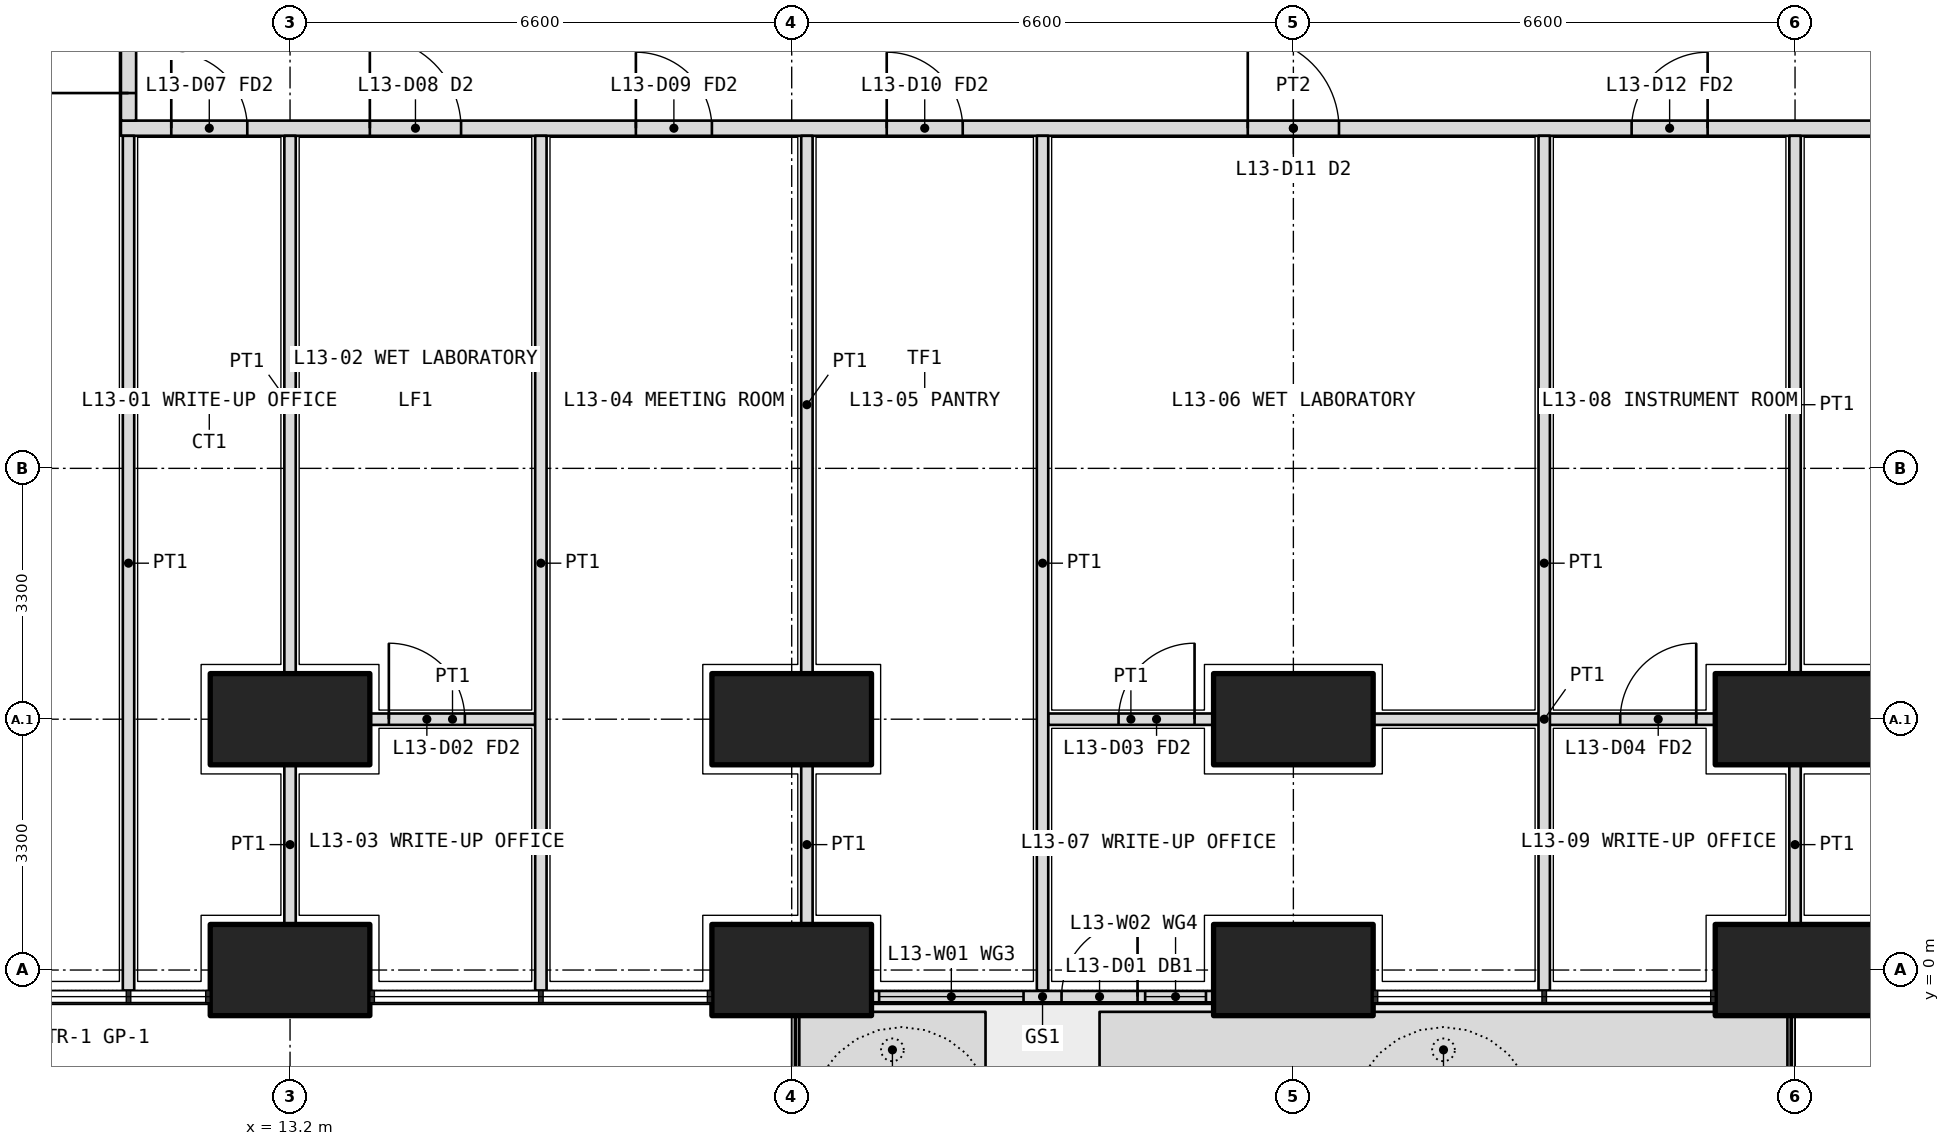
"""IFC4 building model, lengths in metres.
Left out: names, types, materials, properties, quantities, classifications, styles, units other than length and angle.
Written with IfcOpenShell. Run it as: python <this file> out.ifc"""

import sys

from ifc_helpers import new_model, si_unit, direction, frame, frame_2d, origin, origin_2d, place, context, subcontext, project, spatial, polyline, rectangle, outline, extrude, element, fill, save


model = new_model("IFC4")
c1 = context("Model", 3, precision=1e-05, world=origin(), true_north=direction((0.0, 1.0)))
c2 = subcontext(c1, "Body", "Model", "MODEL_VIEW")
j1 = project(units=[si_unit("LENGTHUNIT", "METRE"), si_unit("PLANEANGLEUNIT", "RADIAN")], contexts=[c1])
p1 = place(None, origin())
s1 = spatial("IfcSite", under=j1, at=p1, CompositionType="ELEMENT")
p2 = place(p1, origin())
s2 = spatial("IfcBuilding", under=s1, at=p2, CompositionType="ELEMENT")
p3 = place(p2, frame((0.0, 0.0, 59.1)))
s3 = spatial("IfcBuildingStorey", under=s2, at=p3, CompositionType="ELEMENT", Elevation=59.1)
for number, where, z_axis, x_axis in (
    (1, (13.2, 0.0, 0.0), (0.0, 0.0, 1.0), (1.0, 0.0, 0.0)),
    (2, (19.8, 0.0, 0.0), (0.0, 0.0, 1.0), (1.0, 0.0, 0.0)),
    (3, (26.4, 0.0, 0.0), (0.0, 0.0, 1.0), (1.0, 0.0, 0.0)),
    (4, (33.0, 0.0, 0.0), (0.0, 0.0, 1.0), (1.0, 0.0, 0.0)),
    (5, (13.2, 3.3, 0.0), (0.0, 0.0, 1.0), (1.0, 0.0, 0.0)),
    (6, (19.8, 3.3, 0.0), (0.0, 0.0, 1.0), (1.0, 0.0, 0.0)),
    (7, (26.4, 3.3, 0.0), (0.0, 0.0, 1.0), (1.0, 0.0, 0.0)),
    (8, (33.0, 3.3, 0.0), (0.0, 0.0, 1.0), (1.0, 0.0, 0.0)),
):
    element("IfcColumn", number, at=place(p3, frame(where, z_axis=z_axis, x_axis=x_axis)), inside=s3, PredefinedType="COLUMN", context=c2, shape_type="SweptSolid", body=[
        extrude(rectangle(XDim=2.1, YDim=1.2, at=origin_2d()), origin(), (0.0, 0.0, 1.0), 4.2),
    ])
p4 = place(p3, origin())
e9 = element("IfcWall", 9, at=p4, inside=s3, PredefinedType="USERDEFINED", context=c2, shape_type="SweptSolid", body=[
    extrude(outline(polyline([(19.9, -1.55), (22.35, -1.55), (22.35, -0.55), (19.9, -0.55), (19.9, -1.55)]), holes=[polyline([(20.05, -1.4), (22.2, -1.4), (22.2, -0.7), (20.05, -0.7), (20.05, -1.4)])]), origin(), (0.0, 0.0, 1.0), 1.05),
])
p5 = place(p3, origin())
e10 = element("IfcWall", 10, at=p5, inside=s3, PredefinedType="USERDEFINED", context=c2, shape_type="SweptSolid", body=[
    extrude(outline(polyline([(23.85, -1.55), (32.9, -1.55), (32.9, -0.55), (23.85, -0.55), (23.85, -1.55)]), holes=[polyline([(24.0, -1.4), (32.75, -1.4), (32.75, -0.7), (24.0, -0.7), (24.0, -1.4)])]), origin(), (0.0, 0.0, 1.0), 1.05),
])
p6 = place(p3, frame((20.85, -0.35, 0.0), z_axis=(0.0, 0.0, 1.0), x_axis=(1.0, 0.0, 0.0)))
e11 = element("IfcWall", 11, at=p6, inside=s3, PredefinedType="SOLIDWALL", context=c2, shape_type="SweptSolid", body=[
    extrude(rectangle(XDim=4.5, YDim=0.15, at=frame_2d((2.25, 0.0))), origin(), (0.0, 0.0, 1.0), 2.7),
])
p7 = place(p6, frame((2.5, 0.0, 0.0)))
e12 = element("IfcOpeningElement", 12, at=p7, cuts=e11, PredefinedType="OPENING", context=c2, shape_type="SweptSolid", body=[
    extrude(rectangle(XDim=1.0, YDim=2.4, at=frame_2d((0.5, 1.2))), frame((0.0, 0.085, 0.0), z_axis=(0.0, -1.0, 0.0), x_axis=(1.0, 0.0, 0.0)), (0.0, 0.0, 1.0), 0.17),
])
p8 = place(p6, frame((0.1, 0.0, 0.1)))
e13 = element("IfcOpeningElement", 13, at=p8, cuts=e11, PredefinedType="OPENING", context=c2, shape_type="SweptSolid", body=[
    extrude(rectangle(XDim=1.9, YDim=2.3, at=frame_2d((0.95, 1.15))), frame((0.0, 0.085, 0.0), z_axis=(0.0, -1.0, 0.0), x_axis=(1.0, 0.0, 0.0)), (0.0, 0.0, 1.0), 0.17),
])
p9 = place(p6, frame((3.6, 0.0, 0.1)))
e14 = element("IfcOpeningElement", 14, at=p9, cuts=e11, PredefinedType="OPENING", context=c2, shape_type="SweptSolid", body=[
    extrude(rectangle(XDim=0.8, YDim=2.3, at=frame_2d((0.4, 1.15))), frame((0.0, 0.085, 0.0), z_axis=(0.0, -1.0, 0.0), x_axis=(1.0, 0.0, 0.0)), (0.0, 0.0, 1.0), 0.17),
])
p10 = place(p3, frame((10.975, 11.075, 0.0), z_axis=(0.0, 0.0, 1.0), x_axis=(1.0, 0.0, 0.0)))
e15 = element("IfcWall", 15, at=p10, inside=s3, PredefinedType="PARTITIONING", context=c2, shape_type="SweptSolid", body=[
    extrude(rectangle(XDim=30.85, YDim=0.2, at=frame_2d((15.425, 0.0))), origin(), (0.0, 0.0, 1.0), 2.85),
])
p11 = place(p10, frame((0.663, 0.0, 0.0)))
e16 = element("IfcOpeningElement", 16, at=p11, cuts=e15, PredefinedType="OPENING", context=c2, shape_type="SweptSolid", body=[
    extrude(rectangle(XDim=1.0, YDim=2.1, at=frame_2d((0.5, 1.05))), frame((0.0, 0.11, 0.0), z_axis=(0.0, -1.0, 0.0), x_axis=(1.0, 0.0, 0.0)), (0.0, 0.0, 1.0), 0.22),
])
p12 = place(p10, frame((3.275, 0.0, 0.0)))
e17 = element("IfcOpeningElement", 17, at=p12, cuts=e15, PredefinedType="OPENING", context=c2, shape_type="SweptSolid", body=[
    extrude(rectangle(XDim=1.2, YDim=2.1, at=frame_2d((0.6, 1.05))), frame((0.0, 0.11, 0.0), z_axis=(0.0, -1.0, 0.0), x_axis=(1.0, 0.0, 0.0)), (0.0, 0.0, 1.0), 0.22),
])
p13 = place(p10, frame((6.775, 0.0, 0.0)))
e18 = element("IfcOpeningElement", 18, at=p13, cuts=e15, PredefinedType="OPENING", context=c2, shape_type="SweptSolid", body=[
    extrude(rectangle(XDim=1.0, YDim=2.1, at=frame_2d((0.5, 1.05))), frame((0.0, 0.11, 0.0), z_axis=(0.0, -1.0, 0.0), x_axis=(1.0, 0.0, 0.0)), (0.0, 0.0, 1.0), 0.22),
])
p14 = place(p10, frame((10.075, 0.0, 0.0)))
e19 = element("IfcOpeningElement", 19, at=p14, cuts=e15, PredefinedType="OPENING", context=c2, shape_type="SweptSolid", body=[
    extrude(rectangle(XDim=1.0, YDim=2.1, at=frame_2d((0.5, 1.05))), frame((0.0, 0.11, 0.0), z_axis=(0.0, -1.0, 0.0), x_axis=(1.0, 0.0, 0.0)), (0.0, 0.0, 1.0), 0.22),
])
p15 = place(p10, frame((14.825, 0.0, 0.0)))
e20 = element("IfcOpeningElement", 20, at=p15, cuts=e15, PredefinedType="OPENING", context=c2, shape_type="SweptSolid", body=[
    extrude(rectangle(XDim=1.2, YDim=2.1, at=frame_2d((0.6, 1.05))), frame((0.0, 0.11, 0.0), z_axis=(0.0, -1.0, 0.0), x_axis=(1.0, 0.0, 0.0)), (0.0, 0.0, 1.0), 0.22),
])
p16 = place(p10, frame((19.875, 0.0, 0.0)))
e21 = element("IfcOpeningElement", 21, at=p16, cuts=e15, PredefinedType="OPENING", context=c2, shape_type="SweptSolid", body=[
    extrude(rectangle(XDim=1.0, YDim=2.1, at=frame_2d((0.5, 1.05))), frame((0.0, 0.11, 0.0), z_axis=(0.0, -1.0, 0.0), x_axis=(1.0, 0.0, 0.0)), (0.0, 0.0, 1.0), 0.22),
])
p17 = place(p10, frame((25.887, 0.0, 0.0)))
e22 = element("IfcOpeningElement", 22, at=p17, cuts=e15, PredefinedType="OPENING", context=c2, shape_type="SweptSolid", body=[
    extrude(rectangle(XDim=1.0, YDim=2.1, at=frame_2d((0.5, 1.05))), frame((0.0, 0.11, 0.0), z_axis=(0.0, -1.0, 0.0), x_axis=(1.0, 0.0, 0.0)), (0.0, 0.0, 1.0), 0.22),
])
p18 = place(p3, frame((11.075, 11.175, 0.0), z_axis=(0.0, 0.0, 1.0), x_axis=(0.0, 1.0, 0.0)))
e23 = element("IfcWall", 23, at=p18, inside=s3, PredefinedType="PARTITIONING", context=c2, shape_type="SweptSolid", body=[
    extrude(rectangle(XDim=23.85, YDim=0.2, at=frame_2d((11.925, 0.0))), origin(), (0.0, 0.0, 1.0), 2.85),
])
p19 = place(p18, frame((0.363, 0.0, 0.0)))
e24 = element("IfcOpeningElement", 24, at=p19, cuts=e23, PredefinedType="OPENING", context=c2, shape_type="SweptSolid", body=[
    extrude(rectangle(XDim=1.2, YDim=2.1, at=frame_2d((0.6, 1.05))), frame((0.0, 0.11, 0.0), z_axis=(0.0, -1.0, 0.0), x_axis=(1.0, 0.0, 0.0)), (0.0, 0.0, 1.0), 0.22),
])
p20 = place(p18, frame((2.575, 0.0, 0.0)))
e25 = element("IfcOpeningElement", 25, at=p20, cuts=e23, PredefinedType="OPENING", context=c2, shape_type="SweptSolid", body=[
    extrude(rectangle(XDim=1.0, YDim=2.1, at=frame_2d((0.5, 1.05))), frame((0.0, 0.11, 0.0), z_axis=(0.0, -1.0, 0.0), x_axis=(1.0, 0.0, 0.0)), (0.0, 0.0, 1.0), 0.22),
])
p21 = place(p18, frame((5.65, 0.0, 0.0)))
e26 = element("IfcOpeningElement", 26, at=p21, cuts=e23, PredefinedType="OPENING", context=c2, shape_type="SweptSolid", body=[
    extrude(rectangle(XDim=0.9, YDim=2.1, at=frame_2d((0.45, 1.05))), frame((0.0, 0.11, 0.0), z_axis=(0.0, -1.0, 0.0), x_axis=(1.0, 0.0, 0.0)), (0.0, 0.0, 1.0), 0.22),
])
p22 = place(p18, frame((9.5, 0.0, 0.0)))
e27 = element("IfcOpeningElement", 27, at=p22, cuts=e23, PredefinedType="OPENING", context=c2, shape_type="SweptSolid", body=[
    extrude(rectangle(XDim=0.9, YDim=2.1, at=frame_2d((0.45, 1.05))), frame((0.0, 0.11, 0.0), z_axis=(0.0, -1.0, 0.0), x_axis=(1.0, 0.0, 0.0)), (0.0, 0.0, 1.0), 0.22),
])
p23 = place(p18, frame((13.025, 0.0, 0.0)))
e28 = element("IfcOpeningElement", 28, at=p23, cuts=e23, PredefinedType="OPENING", context=c2, shape_type="SweptSolid", body=[
    extrude(rectangle(XDim=1.0, YDim=2.1, at=frame_2d((0.5, 1.05))), frame((0.0, 0.11, 0.0), z_axis=(0.0, -1.0, 0.0), x_axis=(1.0, 0.0, 0.0)), (0.0, 0.0, 1.0), 0.22),
])
p24 = place(p18, frame((18.025, 0.0, 0.0)))
e29 = element("IfcOpeningElement", 29, at=p24, cuts=e23, PredefinedType="OPENING", context=c2, shape_type="SweptSolid", body=[
    extrude(rectangle(XDim=1.0, YDim=2.1, at=frame_2d((0.5, 1.05))), frame((0.0, 0.11, 0.0), z_axis=(0.0, -1.0, 0.0), x_axis=(1.0, 0.0, 0.0)), (0.0, 0.0, 1.0), 0.22),
])
p25 = place(p18, frame((22.387, 0.0, 0.0)))
e30 = element("IfcOpeningElement", 30, at=p25, cuts=e23, PredefinedType="OPENING", context=c2, shape_type="SweptSolid", body=[
    extrude(rectangle(XDim=1.0, YDim=2.1, at=frame_2d((0.5, 1.05))), frame((0.0, 0.11, 0.0), z_axis=(0.0, -1.0, 0.0), x_axis=(1.0, 0.0, 0.0)), (0.0, 0.0, 1.0), 0.22),
])
p26 = place(p3, frame((11.075, -0.27, 0.0), z_axis=(0.0, 0.0, 1.0), x_axis=(0.0, 1.0, 0.0)))
e31 = element("IfcWall", 31, at=p26, inside=s3, PredefinedType="PARTITIONING", context=c2, shape_type="SweptSolid", body=[
    extrude(rectangle(XDim=11.245, YDim=0.15, at=frame_2d((5.623, 0.0))), origin(), (0.0, 0.0, 1.0), 2.7),
])
p27 = place(p3, frame((14.25, 3.3, 0.0), z_axis=(0.0, 0.0, 1.0), x_axis=(1.0, 0.0, 0.0)))
e32 = element("IfcWall", 32, at=p27, inside=s3, PredefinedType="PARTITIONING", context=c2, shape_type="SweptSolid", body=[
    extrude(rectangle(XDim=2.175, YDim=0.15, at=frame_2d((1.087, 0.0))), origin(), (0.0, 0.0, 1.0), 3.9),
])
p28 = place(p27, frame((0.25, 0.0, 0.0)))
e33 = element("IfcOpeningElement", 33, at=p28, cuts=e32, PredefinedType="OPENING", context=c2, shape_type="SweptSolid", body=[
    extrude(rectangle(XDim=1.0, YDim=2.1, at=frame_2d((0.5, 1.05))), frame((0.0, 0.085, 0.0), z_axis=(0.0, -1.0, 0.0), x_axis=(1.0, 0.0, 0.0)), (0.0, 0.0, 1.0), 0.17),
])
p29 = place(p3, frame((23.175, 3.3, 0.0), z_axis=(0.0, 0.0, 1.0), x_axis=(1.0, 0.0, 0.0)))
e34 = element("IfcWall", 34, at=p29, inside=s3, PredefinedType="PARTITIONING", context=c2, shape_type="SweptSolid", body=[
    extrude(rectangle(XDim=2.175, YDim=0.15, at=frame_2d((1.087, 0.0))), origin(), (0.0, 0.0, 1.0), 3.9),
])
p30 = place(p29, frame((0.925, 0.0, 0.0)))
e35 = element("IfcOpeningElement", 35, at=p30, cuts=e34, PredefinedType="OPENING", context=c2, shape_type="SweptSolid", body=[
    extrude(rectangle(XDim=1.0, YDim=2.1, at=frame_2d((0.5, 1.05))), frame((0.0, 0.085, 0.0), z_axis=(0.0, -1.0, 0.0), x_axis=(1.0, 0.0, 0.0)), (0.0, 0.0, 1.0), 0.17),
])
p31 = place(p3, frame((27.45, 3.3, 0.0), z_axis=(0.0, 0.0, 1.0), x_axis=(1.0, 0.0, 0.0)))
e36 = element("IfcWall", 36, at=p31, inside=s3, PredefinedType="PARTITIONING", context=c2, shape_type="SweptSolid", body=[
    extrude(rectangle(XDim=4.5, YDim=0.15, at=frame_2d((2.25, 0.0))), origin(), (0.0, 0.0, 1.0), 3.9),
])
p32 = place(p31, frame((3.25, 0.0, 0.0)))
e37 = element("IfcOpeningElement", 37, at=p32, cuts=e36, PredefinedType="OPENING", context=c2, shape_type="SweptSolid", body=[
    extrude(rectangle(XDim=1.0, YDim=2.1, at=frame_2d((0.5, 1.05))), frame((0.0, 0.085, 0.0), z_axis=(0.0, -1.0, 0.0), x_axis=(1.0, 0.0, 0.0)), (0.0, 0.0, 1.0), 0.17),
])
p33 = place(p3, frame((20.0, 0.6, 0.0), z_axis=(0.0, 0.0, 1.0), x_axis=(0.0, 1.0, 0.0)))
e38 = element("IfcWall", 38, at=p33, inside=s3, PredefinedType="PARTITIONING", context=c2, shape_type="SweptSolid", body=[
    extrude(rectangle(XDim=2.1, YDim=0.15, at=frame_2d((1.05, 0.0))), origin(), (0.0, 0.0, 1.0), 2.85),
])
p34 = place(p3, frame((20.0, 3.9, 0.0), z_axis=(0.0, 0.0, 1.0), x_axis=(0.0, 1.0, 0.0)))
e39 = element("IfcWall", 39, at=p34, inside=s3, PredefinedType="PARTITIONING", context=c2, shape_type="SweptSolid", body=[
    extrude(rectangle(XDim=7.075, YDim=0.15, at=frame_2d((3.538, 0.0))), origin(), (0.0, 0.0, 1.0), 2.85),
])
p35 = place(p3, frame((23.1, -0.27, 0.0), z_axis=(0.0, 0.0, 1.0), x_axis=(0.0, 1.0, 0.0)))
e40 = element("IfcWall", 40, at=p35, inside=s3, PredefinedType="PARTITIONING", context=c2, shape_type="SweptSolid", body=[
    extrude(rectangle(XDim=11.245, YDim=0.15, at=frame_2d((5.623, 0.0))), origin(), (0.0, 0.0, 1.0), 2.7),
])
p36 = place(p3, frame((13.2, 0.6, 0.0), z_axis=(0.0, 0.0, 1.0), x_axis=(0.0, 1.0, 0.0)))
e41 = element("IfcWall", 41, at=p36, inside=s3, PredefinedType="PARTITIONING", context=c2, shape_type="SweptSolid", body=[
    extrude(rectangle(XDim=2.1, YDim=0.15, at=frame_2d((1.05, 0.0))), origin(), (0.0, 0.0, 1.0), 2.85),
])
p37 = place(p3, frame((13.2, 3.9, 0.0), z_axis=(0.0, 0.0, 1.0), x_axis=(0.0, 1.0, 0.0)))
e42 = element("IfcWall", 42, at=p37, inside=s3, PredefinedType="PARTITIONING", context=c2, shape_type="SweptSolid", body=[
    extrude(rectangle(XDim=7.075, YDim=0.15, at=frame_2d((3.538, 0.0))), origin(), (0.0, 0.0, 1.0), 2.85),
])
for number, where, z_axis, x_axis in (
    (43, (16.5, -0.27, 0.0), (0.0, 0.0, 1.0), (0.0, 1.0, 0.0)),
    (44, (29.7, -0.27, 0.0), (0.0, 0.0, 1.0), (0.0, 1.0, 0.0)),
):
    element("IfcWall", number, at=place(p3, frame(where, z_axis=z_axis, x_axis=x_axis)), inside=s3, PredefinedType="PARTITIONING", context=c2, shape_type="SweptSolid", body=[
        extrude(rectangle(XDim=11.245, YDim=0.15, at=frame_2d((5.623, 0.0))), origin(), (0.0, 0.0, 1.0), 2.7),
    ])
p38 = place(p3, frame((33.0, 0.6, 0.0), z_axis=(0.0, 0.0, 1.0), x_axis=(0.0, 1.0, 0.0)))
e45 = element("IfcWall", 45, at=p38, inside=s3, PredefinedType="PARTITIONING", context=c2, shape_type="SweptSolid", body=[
    extrude(rectangle(XDim=2.1, YDim=0.15, at=frame_2d((1.05, 0.0))), origin(), (0.0, 0.0, 1.0), 2.85),
])
p39 = place(p3, frame((33.0, 3.9, 0.0), z_axis=(0.0, 0.0, 1.0), x_axis=(0.0, 1.0, 0.0)))
e46 = element("IfcWall", 46, at=p39, inside=s3, PredefinedType="PARTITIONING", context=c2, shape_type="SweptSolid", body=[
    extrude(rectangle(XDim=7.075, YDim=0.15, at=frame_2d((3.538, 0.0))), origin(), (0.0, 0.0, 1.0), 2.85),
])
p40 = place(p7, origin())
e47 = element("IfcDoor", 47, at=p40, inside=s3, OperationType="SINGLE_SWING_RIGHT", PredefinedType="DOOR", context=c2, shape_type="SweptSolid", body=[
    extrude(rectangle(XDim=1.0, YDim=2.4, at=frame_2d((0.5, 1.2))), frame((0.0, 0.025, 0.0), z_axis=(0.0, -1.0, 0.0), x_axis=(1.0, 0.0, 0.0)), (0.0, 0.0, 1.0), 0.05),
])
fill(e12, e47)
p41 = place(p8, origin())
e48 = element("IfcWindow", 48, at=p41, inside=s3, PartitioningType="SINGLE_PANEL", PredefinedType="WINDOW", context=c2, shape_type="SweptSolid", body=[
    extrude(rectangle(XDim=1.9, YDim=2.3, at=frame_2d((0.95, 1.15))), frame((0.0, 0.03, 0.0), z_axis=(0.0, -1.0, 0.0), x_axis=(1.0, 0.0, 0.0)), (0.0, 0.0, 1.0), 0.06),
])
fill(e13, e48)
p42 = place(p9, origin())
e49 = element("IfcWindow", 49, at=p42, inside=s3, PartitioningType="SINGLE_PANEL", PredefinedType="WINDOW", context=c2, shape_type="SweptSolid", body=[
    extrude(rectangle(XDim=0.8, YDim=2.3, at=frame_2d((0.4, 1.15))), frame((0.0, 0.03, 0.0), z_axis=(0.0, -1.0, 0.0), x_axis=(1.0, 0.0, 0.0)), (0.0, 0.0, 1.0), 0.06),
])
fill(e14, e49)
p43 = place(p11, origin())
e50 = element("IfcDoor", 50, at=p43, inside=s3, OperationType="SINGLE_SWING_LEFT", PredefinedType="DOOR", context=c2, shape_type="SweptSolid", body=[
    extrude(rectangle(XDim=1.0, YDim=2.1, at=frame_2d((0.5, 1.05))), frame((0.0, 0.025, 0.0), z_axis=(0.0, -1.0, 0.0), x_axis=(1.0, 0.0, 0.0)), (0.0, 0.0, 1.0), 0.05),
])
fill(e16, e50)
p44 = place(p12, origin())
e51 = element("IfcDoor", 51, at=p44, inside=s3, OperationType="DOUBLE_DOOR_SINGLE_SWING", PredefinedType="DOOR", context=c2, shape_type="SweptSolid", body=[
    extrude(rectangle(XDim=1.2, YDim=2.1, at=frame_2d((0.6, 1.05))), frame((0.0, 0.025, 0.0), z_axis=(0.0, -1.0, 0.0), x_axis=(1.0, 0.0, 0.0)), (0.0, 0.0, 1.0), 0.05),
])
fill(e17, e51)
p45 = place(p28, origin())
e52 = element("IfcDoor", 52, at=p45, inside=s3, OperationType="SINGLE_SWING_LEFT", PredefinedType="DOOR", context=c2, shape_type="SweptSolid", body=[
    extrude(rectangle(XDim=1.0, YDim=2.1, at=frame_2d((0.5, 1.05))), frame((0.0, 0.025, 0.0), z_axis=(0.0, -1.0, 0.0), x_axis=(1.0, 0.0, 0.0)), (0.0, 0.0, 1.0), 0.05),
])
fill(e33, e52)
p46 = place(p13, origin())
e53 = element("IfcDoor", 53, at=p46, inside=s3, OperationType="SINGLE_SWING_LEFT", PredefinedType="DOOR", context=c2, shape_type="SweptSolid", body=[
    extrude(rectangle(XDim=1.0, YDim=2.1, at=frame_2d((0.5, 1.05))), frame((0.0, 0.025, 0.0), z_axis=(0.0, -1.0, 0.0), x_axis=(1.0, 0.0, 0.0)), (0.0, 0.0, 1.0), 0.05),
])
fill(e18, e53)
p47 = place(p14, origin())
e54 = element("IfcDoor", 54, at=p47, inside=s3, OperationType="SINGLE_SWING_LEFT", PredefinedType="DOOR", context=c2, shape_type="SweptSolid", body=[
    extrude(rectangle(XDim=1.0, YDim=2.1, at=frame_2d((0.5, 1.05))), frame((0.0, 0.025, 0.0), z_axis=(0.0, -1.0, 0.0), x_axis=(1.0, 0.0, 0.0)), (0.0, 0.0, 1.0), 0.05),
])
fill(e19, e54)
p48 = place(p15, origin())
e55 = element("IfcDoor", 55, at=p48, inside=s3, OperationType="DOUBLE_DOOR_SINGLE_SWING", PredefinedType="DOOR", context=c2, shape_type="SweptSolid", body=[
    extrude(rectangle(XDim=1.2, YDim=2.1, at=frame_2d((0.6, 1.05))), frame((0.0, 0.025, 0.0), z_axis=(0.0, -1.0, 0.0), x_axis=(1.0, 0.0, 0.0)), (0.0, 0.0, 1.0), 0.05),
])
fill(e20, e55)
p49 = place(p30, origin())
e56 = element("IfcDoor", 56, at=p49, inside=s3, OperationType="SINGLE_SWING_RIGHT", PredefinedType="DOOR", context=c2, shape_type="SweptSolid", body=[
    extrude(rectangle(XDim=1.0, YDim=2.1, at=frame_2d((0.5, 1.05))), frame((0.0, 0.025, 0.0), z_axis=(0.0, -1.0, 0.0), x_axis=(1.0, 0.0, 0.0)), (0.0, 0.0, 1.0), 0.05),
])
fill(e35, e56)
p50 = place(p16, origin())
e57 = element("IfcDoor", 57, at=p50, inside=s3, OperationType="SINGLE_SWING_RIGHT", PredefinedType="DOOR", context=c2, shape_type="SweptSolid", body=[
    extrude(rectangle(XDim=1.0, YDim=2.1, at=frame_2d((0.5, 1.05))), frame((0.0, 0.025, 0.0), z_axis=(0.0, -1.0, 0.0), x_axis=(1.0, 0.0, 0.0)), (0.0, 0.0, 1.0), 0.05),
])
fill(e21, e57)
p51 = place(p32, origin())
e58 = element("IfcDoor", 58, at=p51, inside=s3, OperationType="SINGLE_SWING_RIGHT", PredefinedType="DOOR", context=c2, shape_type="SweptSolid", body=[
    extrude(rectangle(XDim=1.0, YDim=2.1, at=frame_2d((0.5, 1.05))), frame((0.0, 0.025, 0.0), z_axis=(0.0, -1.0, 0.0), x_axis=(1.0, 0.0, 0.0)), (0.0, 0.0, 1.0), 0.05),
])
fill(e37, e58)
p52 = place(p19, origin())
e59 = element("IfcDoor", 59, at=p52, inside=s3, OperationType="DOUBLE_DOOR_SINGLE_SWING", PredefinedType="DOOR", context=c2, shape_type="SweptSolid", body=[
    extrude(rectangle(XDim=1.2, YDim=2.1, at=frame_2d((0.6, 1.05))), frame((0.0, 0.025, 0.0), z_axis=(0.0, -1.0, 0.0), x_axis=(1.0, 0.0, 0.0)), (0.0, 0.0, 1.0), 0.05),
])
fill(e24, e59)
save(model, sys.argv[1])
